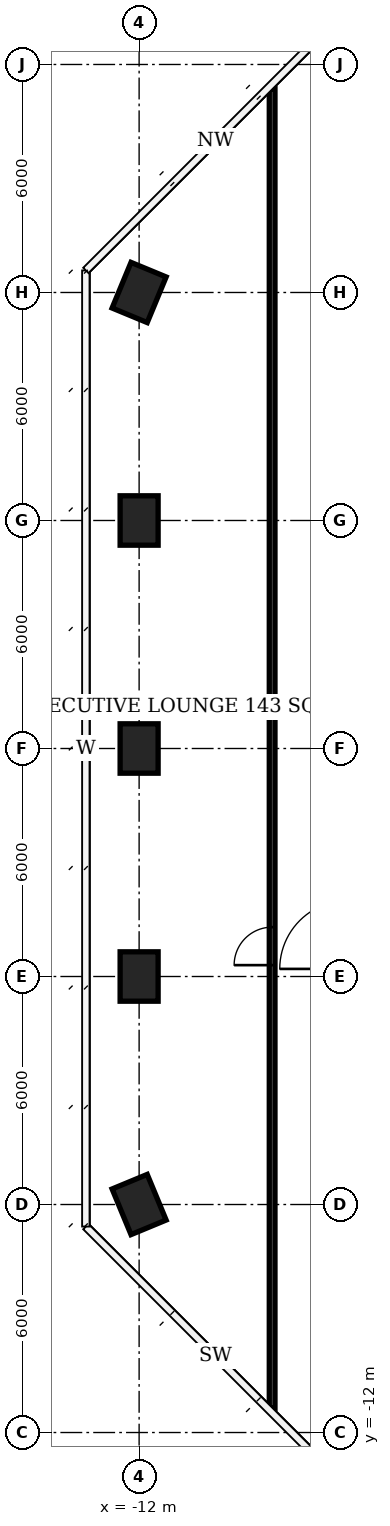
"""IFC4 building model, lengths in metres.
Left out: names, types, materials, properties, quantities, classifications, styles, units other than length and angle.
Written with IfcOpenShell. Run it as: python <this file> out.ifc"""

import sys

from ifc_helpers import new_model, si_unit, direction, frame, frame_2d, origin, origin_2d, place, context, subcontext, project, spatial, rectangle, extrude, element, fill, save


model = new_model("IFC4")
c1 = context("Model", 3, precision=1e-05, world=origin(), true_north=direction((0.0, 1.0)))
c2 = subcontext(c1, "Body", "Model", "MODEL_VIEW")
j1 = project(units=[si_unit("LENGTHUNIT", "METRE"), si_unit("PLANEANGLEUNIT", "RADIAN")], contexts=[c1])
p1 = place(None, origin())
s1 = spatial("IfcSite", under=j1, at=p1, CompositionType="ELEMENT")
p2 = place(p1, origin())
s2 = spatial("IfcBuilding", under=s1, at=p2, CompositionType="ELEMENT")
p3 = place(p2, frame((0.0, 0.0, 252.8)))
s3 = spatial("IfcBuildingStorey", under=s2, at=p3, CompositionType="ELEMENT", Elevation=252.8)
for number, where, z_axis, x_axis in (
    (1, (-12.0, -6.0, 0.0), (0.0, 0.0, 1.0), (-0.383, 0.924, 0.0)),
    (2, (-12.0, 0.0, 0.0), (0.0, 0.0, 1.0), (0.0, 1.0, 0.0)),
    (3, (-12.0, 6.0, 0.0), (0.0, 0.0, 1.0), (0.0, 1.0, 0.0)),
    (4, (-12.0, 12.0, 0.0), (0.0, 0.0, 1.0), (0.0, 1.0, 0.0)),
    (5, (-12.0, 18.0, 0.0), (0.0, 0.0, 1.0), (0.383, 0.924, 0.0)),
):
    element("IfcColumn", number, at=place(p3, frame(where, z_axis=z_axis, x_axis=x_axis)), inside=s3, PredefinedType="COLUMN", context=c2, shape_type="SweptSolid", body=[
        extrude(rectangle(XDim=1.3, YDim=1.0, at=origin_2d()), origin(), (0.0, 0.0, 1.0), 3.9),
    ])
p4 = place(p3, frame((-8.5, -11.363, 0.0), z_axis=(0.0, 0.0, 1.0), x_axis=(0.0, 1.0, 0.0)))
e6 = element("IfcWall", 6, at=p4, inside=s3, PredefinedType="PARTITIONING", context=c2, shape_type="SweptSolid", body=[
    extrude(rectangle(XDim=34.726, YDim=0.15, at=frame_2d((17.363, 0.0))), origin(), (0.0, 0.0, 1.0), 3.65),
])
p5 = place(p4, frame((11.662, 0.0, 0.0)))
e7 = element("IfcOpeningElement", 7, at=p5, cuts=e6, PredefinedType="OPENING", context=c2, shape_type="SweptSolid", body=[
    extrude(rectangle(XDim=1.0, YDim=2.4, at=frame_2d((0.5, 1.2))), frame((0.0, 0.085, 0.0), z_axis=(0.0, -1.0, 0.0), x_axis=(1.0, 0.0, 0.0)), (0.0, 0.0, 1.0), 0.17),
])
p6 = place(p5, origin())
e8 = element("IfcDoor", 8, at=p6, inside=s3, OperationType="SINGLE_SWING_LEFT", PredefinedType="DOOR", context=c2, shape_type="SweptSolid", body=[
    extrude(rectangle(XDim=1.0, YDim=2.4, at=frame_2d((0.5, 1.2))), frame((0.0, 0.025, 0.0), z_axis=(0.0, -1.0, 0.0), x_axis=(1.0, 0.0, 0.0)), (0.0, 0.0, 1.0), 0.05),
])
fill(e7, e8)
save(model, sys.argv[1])
